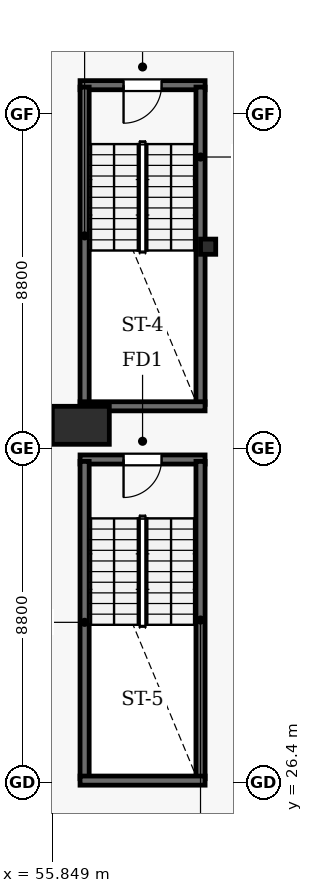
"""IFC4 building model, lengths in metres.
Left out: names, types, materials, properties, quantities, classifications, styles, units other than length and angle.
Written with IfcOpenShell. Run it as: python <this file> out.ifc"""

import sys

from ifc_helpers import new_model, si_unit, direction, frame, frame_2d, origin, origin_2d, place, context, subcontext, project, spatial, rectangle, i_section, extrude, element, fill, save


model = new_model("IFC4")
c1 = context("Model", 3, precision=1e-05, world=origin(), true_north=direction((0.0, 1.0)))
c2 = subcontext(c1, "Body", "Model", "MODEL_VIEW")
j1 = project(units=[si_unit("LENGTHUNIT", "METRE"), si_unit("PLANEANGLEUNIT", "RADIAN")], contexts=[c1])
p1 = place(None, origin())
s1 = spatial("IfcSite", under=j1, at=p1, CompositionType="ELEMENT")
p2 = place(p1, origin())
s2 = spatial("IfcBuilding", under=s1, at=p2, CompositionType="ELEMENT")
p3 = place(p2, frame((0.0, 0.0, -7.8)))
s3 = spatial("IfcBuildingStorey", under=s2, at=p3, CompositionType="ELEMENT", Elevation=-7.8)
p4 = place(p3, frame((56.6, 35.8, 0.0), z_axis=(0.0, 0.0, 1.0), x_axis=(1.0, 0.0, 0.0)))
e1 = element("IfcColumn", 1, at=p4, inside=s3, PredefinedType="COLUMN", context=c2, shape_type="SweptSolid", body=[
    extrude(rectangle(XDim=1.5, YDim=1.0, at=origin_2d()), origin(), (0.0, 0.0, 1.0), 3.9),
])
p5 = place(p3, frame((59.95, 40.5, 0.0), z_axis=(0.0, 0.0, 1.0), x_axis=(1.0, 0.0, 0.0)))
e2 = element("IfcColumn", 2, at=p5, inside=s3, PredefinedType="PILASTER", context=c2, shape_type="SweptSolid", body=[
    extrude(i_section(OverallWidth=0.4, OverallDepth=0.4, WebThickness=0.013, FlangeThickness=0.021, FilletRadius=0.022, at=origin_2d()), origin(), (0.0, 0.0, 1.0), 3.9),
])
p6 = place(p3, frame((56.58, 44.75, 0.0), z_axis=(0.0, 0.0, 1.0), x_axis=(1.0, 0.0, 0.0)))
e3 = element("IfcWall", 3, at=p6, inside=s3, PredefinedType="SHEAR", context=c2, shape_type="SweptSolid", body=[
    extrude(rectangle(XDim=3.29, YDim=0.24, at=frame_2d((1.645, 0.0))), origin(), (0.0, 0.0, 1.0), 3.58),
])
p7 = place(p6, frame((1.145, 0.0, 0.0)))
e4 = element("IfcOpeningElement", 4, at=p7, cuts=e3, PredefinedType="OPENING", context=c2, shape_type="SweptSolid", body=[
    extrude(rectangle(XDim=1.0, YDim=2.15, at=frame_2d((0.5, 1.075))), frame((0.0, 0.13, 0.0), z_axis=(0.0, -1.0, 0.0), x_axis=(1.0, 0.0, 0.0)), (0.0, 0.0, 1.0), 0.26),
])
p8 = place(p3, frame((56.58, 34.9, 0.0), z_axis=(0.0, 0.0, 1.0), x_axis=(1.0, 0.0, 0.0)))
e5 = element("IfcWall", 5, at=p8, inside=s3, PredefinedType="SHEAR", context=c2, shape_type="SweptSolid", body=[
    extrude(rectangle(XDim=3.29, YDim=0.24, at=frame_2d((1.645, 0.0))), origin(), (0.0, 0.0, 1.0), 3.58),
])
p9 = place(p8, frame((1.145, 0.0, 0.0)))
e6 = element("IfcOpeningElement", 6, at=p9, cuts=e5, PredefinedType="OPENING", context=c2, shape_type="SweptSolid", body=[
    extrude(rectangle(XDim=1.0, YDim=2.15, at=frame_2d((0.5, 1.075))), frame((0.0, 0.13, 0.0), z_axis=(0.0, -1.0, 0.0), x_axis=(1.0, 0.0, 0.0)), (0.0, 0.0, 1.0), 0.26),
])
for number, where, z_axis, x_axis in (
    (7, (56.7, 36.35, 0.0), (0.0, 0.0, 1.0), (0.0, 1.0, 0.0)),
    (8, (59.75, 36.35, 0.0), (0.0, 0.0, 1.0), (0.0, 1.0, 0.0)),
):
    element("IfcWall", number, at=place(p3, frame(where, z_axis=z_axis, x_axis=x_axis)), inside=s3, PredefinedType="SHEAR", context=c2, shape_type="SweptSolid", body=[
        extrude(rectangle(XDim=8.35, YDim=0.24, at=frame_2d((4.175, 0.0))), origin(), (0.0, 0.0, 1.0), 3.58),
    ])
for number, where, z_axis, x_axis in (
    (9, (56.7, 26.5, 0.0), (0.0, 0.0, 1.0), (0.0, 1.0, 0.0)),
    (10, (59.75, 26.5, 0.0), (0.0, 0.0, 1.0), (0.0, 1.0, 0.0)),
):
    element("IfcWall", number, at=place(p3, frame(where, z_axis=z_axis, x_axis=x_axis)), inside=s3, PredefinedType="SHEAR", context=c2, shape_type="SweptSolid", body=[
        extrude(rectangle(XDim=8.35, YDim=0.24, at=frame_2d((4.175, 0.0))), origin(), (0.0, 0.0, 1.0), 3.58),
    ])
for number, where, z_axis, x_axis in (
    (11, (56.58, 36.3, 0.0), (0.0, 0.0, 1.0), (1.0, 0.0, 0.0)),
    (12, (56.58, 26.45, 0.0), (0.0, 0.0, 1.0), (1.0, 0.0, 0.0)),
):
    element("IfcWall", number, at=place(p3, frame(where, z_axis=z_axis, x_axis=x_axis)), inside=s3, PredefinedType="SHEAR", context=c2, shape_type="SweptSolid", body=[
        extrude(rectangle(XDim=3.29, YDim=0.24, at=frame_2d((1.645, 0.0))), origin(), (0.0, 0.0, 1.0), 3.58),
    ])
p10 = place(p7, frame((1.0, 0.0, 0.0), z_axis=(0.0, 0.0, 1.0), x_axis=(-1.0, 0.0, 0.0)))
e13 = element("IfcDoor", 13, at=p10, inside=s3, OperationType="SINGLE_SWING_LEFT", PredefinedType="DOOR", context=c2, shape_type="SweptSolid", body=[
    extrude(rectangle(XDim=1.0, YDim=2.15, at=frame_2d((0.5, 1.075))), frame((0.0, 0.025, 0.0), z_axis=(0.0, -1.0, 0.0), x_axis=(1.0, 0.0, 0.0)), (0.0, 0.0, 1.0), 0.05),
])
fill(e4, e13)
p11 = place(p9, frame((1.0, 0.0, 0.0), z_axis=(0.0, 0.0, 1.0), x_axis=(-1.0, 0.0, 0.0)))
e14 = element("IfcDoor", 14, at=p11, inside=s3, OperationType="SINGLE_SWING_LEFT", PredefinedType="DOOR", context=c2, shape_type="SweptSolid", body=[
    extrude(rectangle(XDim=1.0, YDim=2.15, at=frame_2d((0.5, 1.075))), frame((0.0, 0.025, 0.0), z_axis=(0.0, -1.0, 0.0), x_axis=(1.0, 0.0, 0.0)), (0.0, 0.0, 1.0), 0.05),
])
fill(e6, e14)
save(model, sys.argv[1])
